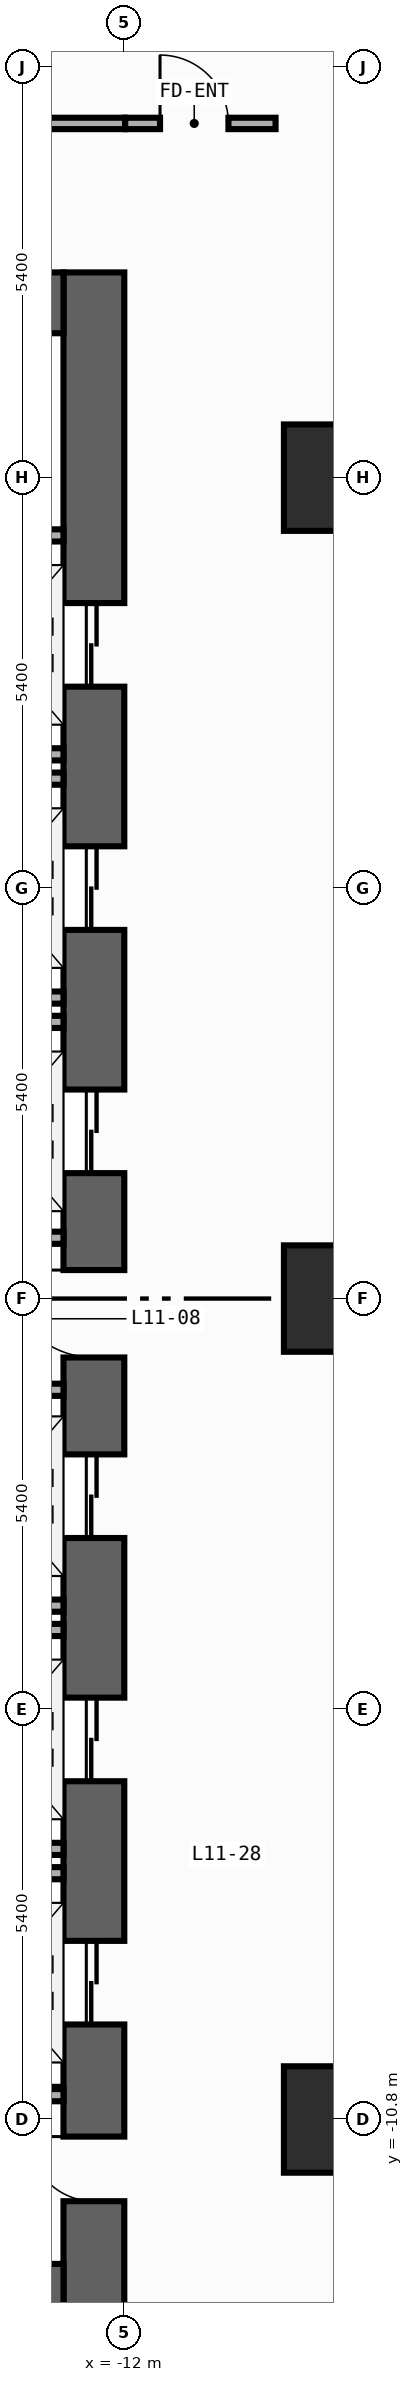
"""IFC4 building model, lengths in metres.
Left out: names, types, materials, properties, quantities, classifications, styles, units other than length and angle.
Written with IfcOpenShell. Run it as: python <this file> out.ifc"""

import sys

from ifc_helpers import new_model, si_unit, direction, frame, frame_2d, origin, origin_2d, place, context, subcontext, project, spatial, rectangle, extrude, element, fill, save


model = new_model("IFC4")
c1 = context("Model", 3, precision=1e-05, world=origin(), true_north=direction((0.0, 1.0)))
c2 = subcontext(c1, "Body", "Model", "MODEL_VIEW")
j1 = project(units=[si_unit("LENGTHUNIT", "METRE"), si_unit("PLANEANGLEUNIT", "RADIAN")], contexts=[c1])
p1 = place(None, origin())
s1 = spatial("IfcSite", under=j1, at=p1, CompositionType="ELEMENT")
p2 = place(p1, origin())
s2 = spatial("IfcBuilding", under=s1, at=p2, CompositionType="ELEMENT")
p3 = place(p2, frame((0.0, 0.0, 47.0)))
s3 = spatial("IfcBuildingStorey", under=s2, at=p3, CompositionType="ELEMENT", Elevation=47.0)
p4 = place(p3, frame((-12.4, -13.5, 0.0), z_axis=(0.0, 0.0, 1.0), x_axis=(0.0, 1.0, 0.0)))
e1 = element("IfcWall", 1, at=p4, inside=s3, PredefinedType="SHEAR", context=c2, shape_type="SweptSolid", body=[
    extrude(rectangle(XDim=27.0, YDim=0.8, at=frame_2d((13.5, 0.0))), origin(), (0.0, 0.0, 1.0), 3.94),
])
p5 = place(p4, frame((21.55, 0.0, 0.0)))
e2 = element("IfcOpeningElement", 2, at=p5, cuts=e1, PredefinedType="OPENING", context=c2, shape_type="SweptSolid", body=[
    extrude(rectangle(XDim=1.1, YDim=2.2, at=frame_2d((0.55, 1.1))), frame((0.0, 0.41, 0.0), z_axis=(0.0, -1.0, 0.0), x_axis=(1.0, 0.0, 0.0)), (0.0, 0.0, 1.0), 0.82),
])
p6 = place(p4, frame((18.35, 0.0, 0.0)))
e3 = element("IfcOpeningElement", 3, at=p6, cuts=e1, PredefinedType="OPENING", context=c2, shape_type="SweptSolid", body=[
    extrude(rectangle(XDim=1.1, YDim=2.2, at=frame_2d((0.55, 1.1))), frame((0.0, 0.41, 0.0), z_axis=(0.0, -1.0, 0.0), x_axis=(1.0, 0.0, 0.0)), (0.0, 0.0, 1.0), 0.82),
])
p7 = place(p4, frame((15.15, 0.0, 0.0)))
e4 = element("IfcOpeningElement", 4, at=p7, cuts=e1, PredefinedType="OPENING", context=c2, shape_type="SweptSolid", body=[
    extrude(rectangle(XDim=1.1, YDim=2.2, at=frame_2d((0.55, 1.1))), frame((0.0, 0.41, 0.0), z_axis=(0.0, -1.0, 0.0), x_axis=(1.0, 0.0, 0.0)), (0.0, 0.0, 1.0), 0.82),
])
p8 = place(p4, frame((10.35, 0.0, 0.0)))
e5 = element("IfcOpeningElement", 5, at=p8, cuts=e1, PredefinedType="OPENING", context=c2, shape_type="SweptSolid", body=[
    extrude(rectangle(XDim=1.1, YDim=2.2, at=frame_2d((0.55, 1.1))), frame((0.0, 0.41, 0.0), z_axis=(0.0, -1.0, 0.0), x_axis=(1.0, 0.0, 0.0)), (0.0, 0.0, 1.0), 0.82),
])
p9 = place(p4, frame((7.15, 0.0, 0.0)))
e6 = element("IfcOpeningElement", 6, at=p9, cuts=e1, PredefinedType="OPENING", context=c2, shape_type="SweptSolid", body=[
    extrude(rectangle(XDim=1.1, YDim=2.2, at=frame_2d((0.55, 1.1))), frame((0.0, 0.41, 0.0), z_axis=(0.0, -1.0, 0.0), x_axis=(1.0, 0.0, 0.0)), (0.0, 0.0, 1.0), 0.82),
])
p10 = place(p4, frame((3.95, 0.0, 0.0)))
e7 = element("IfcOpeningElement", 7, at=p10, cuts=e1, PredefinedType="OPENING", context=c2, shape_type="SweptSolid", body=[
    extrude(rectangle(XDim=1.1, YDim=2.2, at=frame_2d((0.55, 1.1))), frame((0.0, 0.41, 0.0), z_axis=(0.0, -1.0, 0.0), x_axis=(1.0, 0.0, 0.0)), (0.0, 0.0, 1.0), 0.82),
])
p11 = place(p4, frame((12.725, 0.0, 0.0)))
e8 = element("IfcOpeningElement", 8, at=p11, cuts=e1, PredefinedType="OPENING", context=c2, shape_type="SweptSolid", body=[
    extrude(rectangle(XDim=1.15, YDim=2.2, at=frame_2d((0.575, 1.1))), frame((0.0, 0.41, 0.0), z_axis=(0.0, -1.0, 0.0), x_axis=(1.0, 0.0, 0.0)), (0.0, 0.0, 1.0), 0.82),
])
p12 = place(p4, frame((1.625, 0.0, 0.0)))
e9 = element("IfcOpeningElement", 9, at=p12, cuts=e1, PredefinedType="OPENING", context=c2, shape_type="SweptSolid", body=[
    extrude(rectangle(XDim=0.85, YDim=2.1, at=frame_2d((0.425, 1.05))), frame((0.0, 0.41, 0.0), z_axis=(0.0, -1.0, 0.0), x_axis=(1.0, 0.0, 0.0)), (0.0, 0.0, 1.0), 0.82),
])
for number, where, z_axis, x_axis in (
    (10, (-19.6, -13.1, 0.0), (0.0, 0.0, 1.0), (1.0, 0.0, 0.0)),
    (11, (-19.6, 13.1, 0.0), (0.0, 0.0, 1.0), (1.0, 0.0, 0.0)),
):
    element("IfcWall", number, at=place(p3, frame(where, z_axis=z_axis, x_axis=x_axis)), inside=s3, PredefinedType="SHEAR", context=c2, shape_type="SweptSolid", body=[
        extrude(rectangle(XDim=6.8, YDim=0.8, at=frame_2d((3.4, 0.0))), origin(), (0.0, 0.0, 1.0), 3.94),
    ])
for number, where, z_axis, x_axis in (
    (12, (-9.2, -10.8, 0.0), (0.0, 0.0, 1.0), (1.0, 0.0, 0.0)),
    (13, (-9.2, 0.0, 0.0), (0.0, 0.0, 1.0), (1.0, 0.0, 0.0)),
    (14, (-9.2, 10.8, 0.0), (0.0, 0.0, 1.0), (1.0, 0.0, 0.0)),
):
    element("IfcColumn", number, at=place(p3, frame(where, z_axis=z_axis, x_axis=x_axis)), inside=s3, PredefinedType="COLUMN", context=c2, shape_type="SweptSolid", body=[
        extrude(rectangle(XDim=1.4, YDim=1.4, at=origin_2d()), origin(), (0.0, 0.0, 1.0), 4.2),
    ])
for number, where, z_axis, x_axis in (
    (15, (-14.99, 7.16, 0.0), (0.0, 0.0, 1.0), (1.0, 0.0, 0.0)),
    (16, (-14.99, 10.04, 0.0), (0.0, 0.0, 1.0), (1.0, 0.0, 0.0)),
    (17, (-14.99, 3.96, 0.0), (0.0, 0.0, 1.0), (1.0, 0.0, 0.0)),
    (18, (-14.99, 6.84, 0.0), (0.0, 0.0, 1.0), (1.0, 0.0, 0.0)),
    (19, (-14.99, 3.64, 0.0), (0.0, 0.0, 1.0), (1.0, 0.0, 0.0)),
    (20, (-14.99, -4.04, 0.0), (0.0, 0.0, 1.0), (1.0, 0.0, 0.0)),
    (21, (-14.99, -7.24, 0.0), (0.0, 0.0, 1.0), (1.0, 0.0, 0.0)),
    (22, (-14.99, -4.36, 0.0), (0.0, 0.0, 1.0), (1.0, 0.0, 0.0)),
    (23, (-14.99, -7.56, 0.0), (0.0, 0.0, 1.0), (1.0, 0.0, 0.0)),
):
    element("IfcWall", number, at=place(p3, frame(where, z_axis=z_axis, x_axis=x_axis)), inside=s3, PredefinedType="STANDARD", context=c2, shape_type="SweptSolid", body=[
        extrude(rectangle(XDim=2.19, YDim=0.16, at=frame_2d((1.095, 0.0))), origin(), (0.0, 0.0, 1.0), 3.94),
    ])
for number, where, z_axis, x_axis in (
    (24, (-15.4, 0.8, 0.0), (0.0, 0.0, 1.0), (1.0, 0.0, 0.0)),
    (25, (-15.4, -1.2, 0.0), (0.0, 0.0, 1.0), (1.0, 0.0, 0.0)),
    (26, (-15.4, -10.48, 0.0), (0.0, 0.0, 1.0), (1.0, 0.0, 0.0)),
):
    element("IfcWall", number, at=place(p3, frame(where, z_axis=z_axis, x_axis=x_axis)), inside=s3, PredefinedType="STANDARD", context=c2, shape_type="SweptSolid", body=[
        extrude(rectangle(XDim=2.6, YDim=0.16, at=frame_2d((1.3, 0.0))), origin(), (0.0, 0.0, 1.0), 3.94),
    ])
p13 = place(p3, frame((-11.99, 15.46, 0.0), z_axis=(0.0, 0.0, 1.0), x_axis=(1.0, 0.0, 0.0)))
e27 = element("IfcWall", 27, at=p13, inside=s3, PredefinedType="PARTITIONING", context=c2, shape_type="SweptSolid", body=[
    extrude(rectangle(XDim=1.98, YDim=0.15, at=frame_2d((0.99, 0.0))), origin(), (0.0, 0.0, 1.0), 3.94),
])
p14 = place(p13, frame((0.46, 0.0, 0.0)))
e28 = element("IfcOpeningElement", 28, at=p14, cuts=e27, PredefinedType="OPENING", context=c2, shape_type="SweptSolid", body=[
    extrude(rectangle(XDim=0.9, YDim=2.15, at=frame_2d((0.45, 1.075))), frame((0.0, 0.085, 0.0), z_axis=(0.0, -1.0, 0.0), x_axis=(1.0, 0.0, 0.0)), (0.0, 0.0, 1.0), 0.17),
])
p15 = place(p3, frame((-20.64, 15.46, 0.0), z_axis=(0.0, 0.0, 1.0), x_axis=(1.0, 0.0, 0.0)))
e29 = element("IfcWall", 29, at=p15, inside=s3, PredefinedType="PARTITIONING", context=c2, shape_type="SweptSolid", body=[
    extrude(rectangle(XDim=8.65, YDim=0.15, at=frame_2d((4.325, 0.0))), origin(), (0.0, 0.0, 1.0), 3.94),
])
p16 = place(p15, frame((2.871, 0.0, 0.0)))
e30 = element("IfcOpeningElement", 30, at=p16, cuts=e29, PredefinedType="OPENING", context=c2, shape_type="SweptSolid", body=[
    extrude(rectangle(XDim=0.9, YDim=2.15, at=frame_2d((0.45, 1.075))), frame((0.0, 0.085, 0.0), z_axis=(0.0, -1.0, 0.0), x_axis=(1.0, 0.0, 0.0)), (0.0, 0.0, 1.0), 0.17),
])
p17 = place(p5, origin())
e31 = element("IfcDoor", 31, at=p17, inside=s3, OperationType="DOUBLE_DOOR_SLIDING", PredefinedType="DOOR", context=c2, shape_type="SweptSolid", body=[
    extrude(rectangle(XDim=1.1, YDim=2.2, at=frame_2d((0.55, 1.1))), frame((0.0, 0.025, 0.0), z_axis=(0.0, -1.0, 0.0), x_axis=(1.0, 0.0, 0.0)), (0.0, 0.0, 1.0), 0.05),
])
fill(e2, e31)
p18 = place(p6, origin())
e32 = element("IfcDoor", 32, at=p18, inside=s3, OperationType="DOUBLE_DOOR_SLIDING", PredefinedType="DOOR", context=c2, shape_type="SweptSolid", body=[
    extrude(rectangle(XDim=1.1, YDim=2.2, at=frame_2d((0.55, 1.1))), frame((0.0, 0.025, 0.0), z_axis=(0.0, -1.0, 0.0), x_axis=(1.0, 0.0, 0.0)), (0.0, 0.0, 1.0), 0.05),
])
fill(e3, e32)
p19 = place(p7, origin())
e33 = element("IfcDoor", 33, at=p19, inside=s3, OperationType="DOUBLE_DOOR_SLIDING", PredefinedType="DOOR", context=c2, shape_type="SweptSolid", body=[
    extrude(rectangle(XDim=1.1, YDim=2.2, at=frame_2d((0.55, 1.1))), frame((0.0, 0.025, 0.0), z_axis=(0.0, -1.0, 0.0), x_axis=(1.0, 0.0, 0.0)), (0.0, 0.0, 1.0), 0.05),
])
fill(e4, e33)
p20 = place(p8, origin())
e34 = element("IfcDoor", 34, at=p20, inside=s3, OperationType="DOUBLE_DOOR_SLIDING", PredefinedType="DOOR", context=c2, shape_type="SweptSolid", body=[
    extrude(rectangle(XDim=1.1, YDim=2.2, at=frame_2d((0.55, 1.1))), frame((0.0, 0.025, 0.0), z_axis=(0.0, -1.0, 0.0), x_axis=(1.0, 0.0, 0.0)), (0.0, 0.0, 1.0), 0.05),
])
fill(e5, e34)
p21 = place(p9, origin())
e35 = element("IfcDoor", 35, at=p21, inside=s3, OperationType="DOUBLE_DOOR_SLIDING", PredefinedType="DOOR", context=c2, shape_type="SweptSolid", body=[
    extrude(rectangle(XDim=1.1, YDim=2.2, at=frame_2d((0.55, 1.1))), frame((0.0, 0.025, 0.0), z_axis=(0.0, -1.0, 0.0), x_axis=(1.0, 0.0, 0.0)), (0.0, 0.0, 1.0), 0.05),
])
fill(e6, e35)
p22 = place(p10, origin())
e36 = element("IfcDoor", 36, at=p22, inside=s3, OperationType="DOUBLE_DOOR_SLIDING", PredefinedType="DOOR", context=c2, shape_type="SweptSolid", body=[
    extrude(rectangle(XDim=1.1, YDim=2.2, at=frame_2d((0.55, 1.1))), frame((0.0, 0.025, 0.0), z_axis=(0.0, -1.0, 0.0), x_axis=(1.0, 0.0, 0.0)), (0.0, 0.0, 1.0), 0.05),
])
fill(e7, e36)
p23 = place(p11, origin())
e37 = element("IfcDoor", 37, at=p23, inside=s3, OperationType="SINGLE_SWING_RIGHT", PredefinedType="DOOR", context=c2, shape_type="SweptSolid", body=[
    extrude(rectangle(XDim=1.15, YDim=2.2, at=frame_2d((0.575, 1.1))), frame((0.0, 0.025, 0.0), z_axis=(0.0, -1.0, 0.0), x_axis=(1.0, 0.0, 0.0)), (0.0, 0.0, 1.0), 0.05),
])
fill(e8, e37)
p24 = place(p12, origin())
e38 = element("IfcDoor", 38, at=p24, inside=s3, OperationType="SINGLE_SWING_RIGHT", PredefinedType="DOOR", context=c2, shape_type="SweptSolid", body=[
    extrude(rectangle(XDim=0.85, YDim=2.1, at=frame_2d((0.425, 1.05))), frame((0.0, 0.025, 0.0), z_axis=(0.0, -1.0, 0.0), x_axis=(1.0, 0.0, 0.0)), (0.0, 0.0, 1.0), 0.05),
])
fill(e9, e38)
p25 = place(p14, origin())
e39 = element("IfcDoor", 39, at=p25, inside=s3, OperationType="SINGLE_SWING_LEFT", PredefinedType="DOOR", context=c2, shape_type="SweptSolid", body=[
    extrude(rectangle(XDim=0.9, YDim=2.15, at=frame_2d((0.45, 1.075))), frame((0.0, 0.025, 0.0), z_axis=(0.0, -1.0, 0.0), x_axis=(1.0, 0.0, 0.0)), (0.0, 0.0, 1.0), 0.05),
])
fill(e28, e39)
save(model, sys.argv[1])
